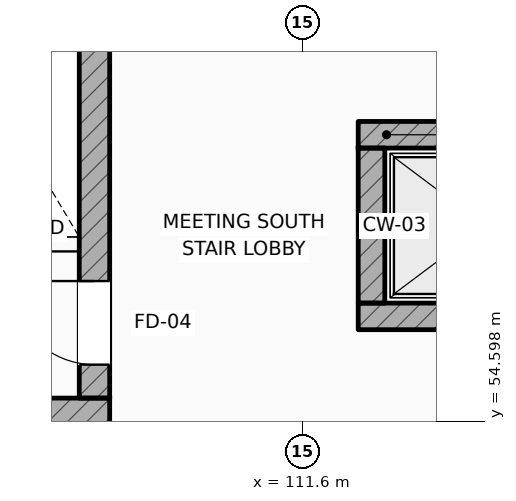
"""IFC4 building model, lengths in metres.
Left out: names, types, materials, properties, quantities, classifications, styles, units other than length and angle.
Written with IfcOpenShell. Run it as: python <this file> out.ifc"""

import sys

from ifc_helpers import new_model, si_unit, direction, frame, frame_2d, origin, place, context, subcontext, project, spatial, rectangle, extrude, element, fill, save


model = new_model("IFC4")
c1 = context("Model", 3, precision=1e-05, world=origin(), true_north=direction((0.0, 1.0)))
c2 = subcontext(c1, "Body", "Model", "MODEL_VIEW")
j1 = project(units=[si_unit("LENGTHUNIT", "METRE"), si_unit("PLANEANGLEUNIT", "RADIAN")], contexts=[c1])
p1 = place(None, origin())
s1 = spatial("IfcSite", under=j1, at=p1, CompositionType="ELEMENT")
p2 = place(p1, origin())
s2 = spatial("IfcBuilding", under=s1, at=p2, CompositionType="ELEMENT")
p3 = place(p2, frame((0.0, 0.0, 20.4)))
s3 = spatial("IfcBuildingStorey", under=s2, at=p3, CompositionType="ELEMENT", Elevation=20.4)
p4 = place(p3, frame((104.1, 54.7, 0.0), z_axis=(0.0, 0.0, 1.0), x_axis=(1.0, 0.0, 0.0)))
e1 = element("IfcWall", 1, at=p4, inside=s3, PredefinedType="SHEAR", context=c2, shape_type="SweptSolid", body=[
    extrude(rectangle(XDim=4.96, YDim=0.4, at=frame_2d((2.48, 0.0))), origin(), (0.0, 0.0, 1.0), 4.2),
])
p5 = place(p3, frame((108.86, 54.9, 0.0), z_axis=(0.0, 0.0, 1.0), x_axis=(0.0, 1.0, 0.0)))
e2 = element("IfcWall", 2, at=p5, inside=s3, PredefinedType="SHEAR", context=c2, shape_type="SweptSolid", body=[
    extrude(rectangle(XDim=9.112, YDim=0.4, at=frame_2d((4.556, 0.0))), origin(), (0.0, 0.0, 1.0), 4.2),
])
p6 = place(p5, frame((0.44, 0.0, 0.0)))
e3 = element("IfcOpeningElement", 3, at=p6, cuts=e2, PredefinedType="OPENING", context=c2, shape_type="SweptSolid", body=[
    extrude(rectangle(XDim=1.1, YDim=2.2, at=frame_2d((0.55, 1.1))), frame((0.0, 0.21, 0.0), z_axis=(0.0, -1.0, 0.0), x_axis=(1.0, 0.0, 0.0)), (0.0, 0.0, 1.0), 0.42),
])
p7 = place(p3, frame((112.33, 58.365, 0.0), z_axis=(0.0, 0.0, 1.0), x_axis=(1.0, 0.0, 0.0)))
e4 = element("IfcWall", 4, at=p7, inside=s3, PredefinedType="SHEAR", context=c2, shape_type="SweptSolid", body=[
    extrude(rectangle(XDim=3.34, YDim=0.35, at=frame_2d((1.67, 0.0))), origin(), (0.0, 0.0, 1.0), 3.94),
])
p8 = place(p7, frame((1.045, 0.0, 0.0)))
e5 = element("IfcOpeningElement", 5, at=p8, cuts=e4, PredefinedType="OPENING", context=c2, shape_type="SweptSolid", body=[
    extrude(rectangle(XDim=1.25, YDim=2.25, at=frame_2d((0.625, 1.125))), frame((0.0, 0.185, 0.0), z_axis=(0.0, -1.0, 0.0), x_axis=(1.0, 0.0, 0.0)), (0.0, 0.0, 1.0), 0.37),
])
p9 = place(p3, frame((112.33, 55.975, 0.0), z_axis=(0.0, 0.0, 1.0), x_axis=(1.0, 0.0, 0.0)))
e6 = element("IfcWall", 6, at=p9, inside=s3, PredefinedType="SHEAR", context=c2, shape_type="SweptSolid", body=[
    extrude(rectangle(XDim=3.34, YDim=0.35, at=frame_2d((1.67, 0.0))), origin(), (0.0, 0.0, 1.0), 3.94),
])
p10 = place(p3, frame((112.505, 56.15, 0.0), z_axis=(0.0, 0.0, 1.0), x_axis=(0.0, 1.0, 0.0)))
e7 = element("IfcWall", 7, at=p10, inside=s3, PredefinedType="SHEAR", context=c2, shape_type="SweptSolid", body=[
    extrude(rectangle(XDim=2.04, YDim=0.35, at=frame_2d((1.02, 0.0))), origin(), (0.0, 0.0, 1.0), 3.94),
])
p11 = place(p6, origin())
e8 = element("IfcDoor", 8, at=p11, inside=s3, OperationType="SINGLE_SWING_RIGHT", PredefinedType="DOOR", context=c2, shape_type="SweptSolid", body=[
    extrude(rectangle(XDim=1.1, YDim=2.2, at=frame_2d((0.55, 1.1))), frame((0.0, 0.025, 0.0), z_axis=(0.0, -1.0, 0.0), x_axis=(1.0, 0.0, 0.0)), (0.0, 0.0, 1.0), 0.05),
])
fill(e3, e8)
save(model, sys.argv[1])
